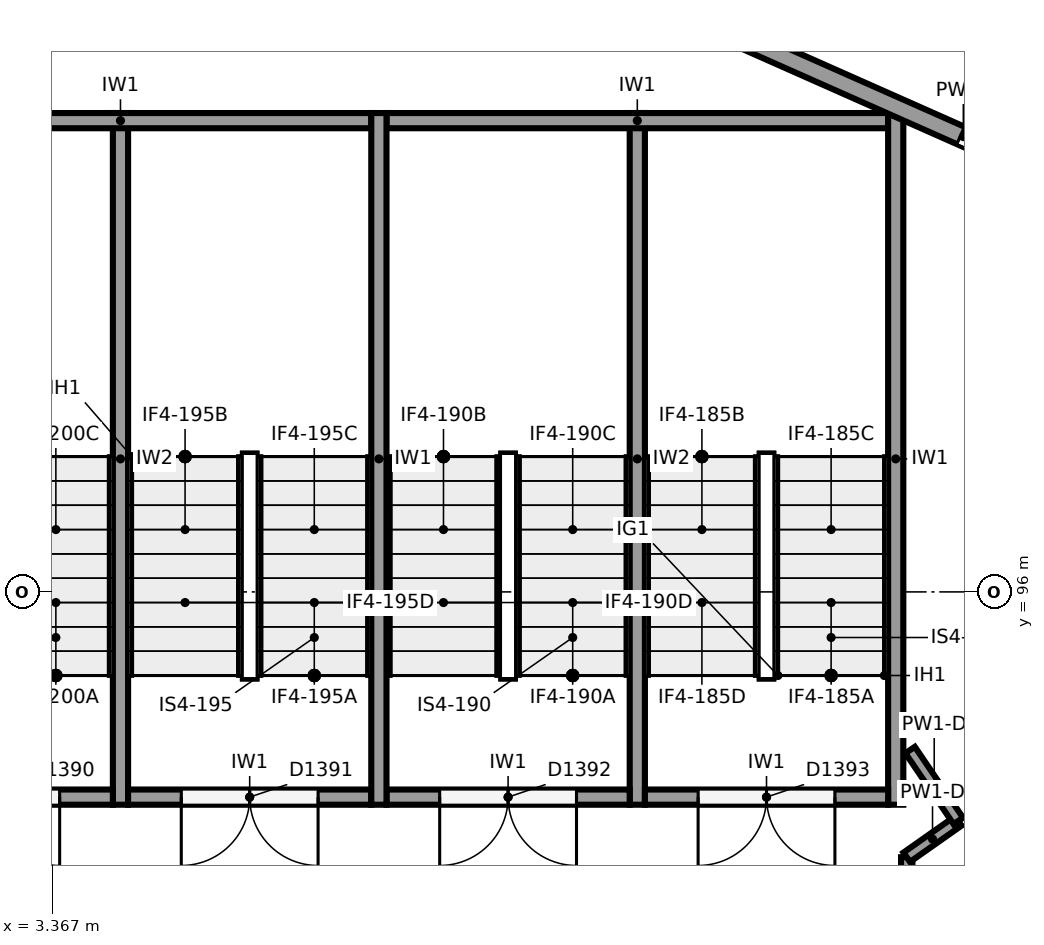
"""IFC4 building model, lengths in metres.
Left out: names, types, materials, properties, quantities, classifications, styles, units other than length and angle.
Written with IfcOpenShell. Run it as: python <this file> out.ifc"""

import sys

from ifc_helpers import new_model, si_unit, direction, frame, frame_2d, origin, place, context, subcontext, project, spatial, rectangle, extrude, element, fill, save


model = new_model("IFC4")
c1 = context("Model", 3, precision=1e-05, world=origin(), true_north=direction((0.0, 1.0)))
c2 = subcontext(c1, "Body", "Model", "MODEL_VIEW")
j1 = project(units=[si_unit("LENGTHUNIT", "METRE"), si_unit("PLANEANGLEUNIT", "RADIAN")], contexts=[c1])
p1 = place(None, origin())
s1 = spatial("IfcSite", under=j1, at=p1, CompositionType="ELEMENT")
p2 = place(p1, origin())
s2 = spatial("IfcBuilding", under=s1, at=p2, CompositionType="ELEMENT")
p3 = place(p2, frame((0.0, 0.0, 18.0)))
s3 = spatial("IfcBuildingStorey", under=s2, at=p3, CompositionType="ELEMENT", Elevation=18.0)
p4 = place(p3, frame((8.123, 105.198, 0.0), z_axis=(0.0, 0.0, 1.0), x_axis=(0.914138897099, -0.405401130748, 0.0)))
e1 = element("IfcWall", 1, at=p4, inside=s3, PredefinedType="SOLIDWALL", context=c2, shape_type="SweptSolid", body=[
    extrude(rectangle(XDim=15.824, YDim=0.25, at=frame_2d((7.912, 0.0))), origin(), (0.0, 0.0, 1.0), 4.3),
])
p5 = place(p4, frame((14.174, 0.0, 1.0)))
e2 = element("IfcOpeningElement", 2, at=p5, cuts=e1, PredefinedType="OPENING", context=c2, shape_type="SweptSolid", body=[
    extrude(rectangle(XDim=0.9, YDim=3.25, at=frame_2d((0.45, 1.625))), frame((0.0, 0.135, 0.0), z_axis=(0.0, -1.0, 0.0), x_axis=(1.0, 0.0, 0.0)), (0.0, 0.0, 1.0), 0.27),
])
p6 = place(p4, frame((12.074, 0.0, 1.0)))
e3 = element("IfcOpeningElement", 3, at=p6, cuts=e1, PredefinedType="OPENING", context=c2, shape_type="SweptSolid", body=[
    extrude(rectangle(XDim=0.9, YDim=3.25, at=frame_2d((0.45, 1.625))), frame((0.0, 0.135, 0.0), z_axis=(0.0, -1.0, 0.0), x_axis=(1.0, 0.0, 0.0)), (0.0, 0.0, 1.0), 0.27),
])
p7 = place(p4, frame((9.974, 0.0, 1.0)))
e4 = element("IfcOpeningElement", 4, at=p7, cuts=e1, PredefinedType="OPENING", context=c2, shape_type="SweptSolid", body=[
    extrude(rectangle(XDim=0.9, YDim=3.25, at=frame_2d((0.45, 1.625))), frame((0.0, 0.135, 0.0), z_axis=(0.0, -1.0, 0.0), x_axis=(1.0, 0.0, 0.0)), (0.0, 0.0, 1.0), 0.27),
])
p8 = place(p4, frame((7.874, 0.0, 1.0)))
e5 = element("IfcOpeningElement", 5, at=p8, cuts=e1, PredefinedType="OPENING", context=c2, shape_type="SweptSolid", body=[
    extrude(rectangle(XDim=0.9, YDim=3.25, at=frame_2d((0.45, 1.625))), frame((0.0, 0.135, 0.0), z_axis=(0.0, -1.0, 0.0), x_axis=(1.0, 0.0, 0.0)), (0.0, 0.0, 1.0), 0.27),
])
p9 = place(p3, frame((-7.256, 98.782, 0.0), z_axis=(0.0, 0.0, 1.0), x_axis=(0.914136361455, 0.405406848322, 0.0)))
e6 = element("IfcWall", 6, at=p9, inside=s3, PredefinedType="SOLIDWALL", context=c2, shape_type="SweptSolid", body=[
    extrude(rectangle(XDim=15.824, YDim=0.25, at=frame_2d((7.912, 0.0))), origin(), (0.0, 0.0, 1.0), 4.3),
])
p10 = place(p9, frame((0.75, 0.0, 1.0)))
e7 = element("IfcOpeningElement", 7, at=p10, cuts=e6, PredefinedType="OPENING", context=c2, shape_type="SweptSolid", body=[
    extrude(rectangle(XDim=0.9, YDim=3.25, at=frame_2d((0.45, 1.625))), frame((0.0, 0.135, 0.0), z_axis=(0.0, -1.0, 0.0), x_axis=(1.0, 0.0, 0.0)), (0.0, 0.0, 1.0), 0.27),
])
p11 = place(p9, frame((2.85, 0.0, 1.0)))
e8 = element("IfcOpeningElement", 8, at=p11, cuts=e6, PredefinedType="OPENING", context=c2, shape_type="SweptSolid", body=[
    extrude(rectangle(XDim=0.9, YDim=3.25, at=frame_2d((0.45, 1.625))), frame((0.0, 0.135, 0.0), z_axis=(0.0, -1.0, 0.0), x_axis=(1.0, 0.0, 0.0)), (0.0, 0.0, 1.0), 0.27),
])
p12 = place(p9, frame((4.95, 0.0, 1.0)))
e9 = element("IfcOpeningElement", 9, at=p12, cuts=e6, PredefinedType="OPENING", context=c2, shape_type="SweptSolid", body=[
    extrude(rectangle(XDim=0.9, YDim=3.25, at=frame_2d((0.45, 1.625))), frame((0.0, 0.135, 0.0), z_axis=(0.0, -1.0, 0.0), x_axis=(1.0, 0.0, 0.0)), (0.0, 0.0, 1.0), 0.27),
])
p13 = place(p9, frame((7.05, 0.0, 1.0)))
e10 = element("IfcOpeningElement", 10, at=p13, cuts=e6, PredefinedType="OPENING", context=c2, shape_type="SweptSolid", body=[
    extrude(rectangle(XDim=0.9, YDim=3.25, at=frame_2d((0.45, 1.625))), frame((0.0, 0.135, 0.0), z_axis=(0.0, -1.0, 0.0), x_axis=(1.0, 0.0, 0.0)), (0.0, 0.0, 1.0), 0.27),
])
for number, where, z_axis, x_axis in (
    (11, (14.467, 102.3, 0.0), (0.0, 0.0, 1.0), (0.0, -1.0, 0.0)),
    (12, (7.667, 102.3, 0.0), (0.0, 0.0, 1.0), (0.0, -1.0, 0.0)),
):
    element("IfcWall", number, at=place(p3, frame(where, z_axis=z_axis, x_axis=x_axis)), inside=s3, PredefinedType="SHEAR", context=c2, shape_type="SweptSolid", body=[
        extrude(rectangle(XDim=9.1, YDim=0.2, at=frame_2d((4.55, 0.0))), origin(), (0.0, 0.0, 1.0), 5.6),
    ])
p14 = place(p3, frame((14.367, 102.2, 0.0), z_axis=(0.0, 0.0, 1.0), x_axis=(-1.0, 0.0, 0.0)))
e13 = element("IfcWall", 13, at=p14, inside=s3, PredefinedType="SHEAR", context=c2, shape_type="SweptSolid", body=[
    extrude(rectangle(XDim=6.6, YDim=0.2, at=frame_2d((3.3, 0.0))), origin(), (0.0, 0.0, 1.0), 5.6),
])
p15 = place(p3, frame((7.567, 102.2, 0.0), z_axis=(0.0, 0.0, 1.0), x_axis=(-1.0, 0.0, 0.0)))
e14 = element("IfcWall", 14, at=p15, inside=s3, PredefinedType="SHEAR", context=c2, shape_type="SweptSolid", body=[
    extrude(rectangle(XDim=6.6, YDim=0.2, at=frame_2d((3.3, 0.0))), origin(), (0.0, 0.0, 1.0), 5.6),
])
for number, where, z_axis, x_axis in (
    (15, (11.067, 102.3, 0.0), (0.0, 0.0, 1.0), (0.0, -1.0, 0.0)),
    (16, (4.267, 102.3, 0.0), (0.0, 0.0, 1.0), (0.0, -1.0, 0.0)),
):
    element("IfcWall", number, at=place(p3, frame(where, z_axis=z_axis, x_axis=x_axis)), inside=s3, PredefinedType="SHEAR", context=c2, shape_type="SweptSolid", body=[
        extrude(rectangle(XDim=9.1, YDim=0.2, at=frame_2d((4.55, 0.0))), origin(), (0.0, 0.0, 1.0), 5.6),
    ])
p16 = place(p3, frame((14.367, 93.3, 0.0), z_axis=(0.0, 0.0, 1.0), x_axis=(-1.0, 0.0, 0.0)))
e17 = element("IfcWall", 17, at=p16, inside=s3, PredefinedType="SHEAR", context=c2, shape_type="SweptSolid", body=[
    extrude(rectangle(XDim=3.2, YDim=0.2, at=frame_2d((1.6, 0.0))), origin(), (0.0, 0.0, 1.0), 5.6),
])
p17 = place(p16, frame((0.7, 0.0, 0.0)))
e18 = element("IfcOpeningElement", 18, at=p17, cuts=e17, PredefinedType="OPENING", context=c2, shape_type="SweptSolid", body=[
    extrude(rectangle(XDim=1.8, YDim=2.1, at=frame_2d((0.9, 1.05))), frame((0.0, 0.11, 0.0), z_axis=(0.0, -1.0, 0.0), x_axis=(1.0, 0.0, 0.0)), (0.0, 0.0, 1.0), 0.22),
])
p18 = place(p3, frame((10.967, 93.3, 0.0), z_axis=(0.0, 0.0, 1.0), x_axis=(-1.0, 0.0, 0.0)))
e19 = element("IfcWall", 19, at=p18, inside=s3, PredefinedType="SHEAR", context=c2, shape_type="SweptSolid", body=[
    extrude(rectangle(XDim=3.2, YDim=0.2, at=frame_2d((1.6, 0.0))), origin(), (0.0, 0.0, 1.0), 5.6),
])
p19 = place(p18, frame((0.7, 0.0, 0.0)))
e20 = element("IfcOpeningElement", 20, at=p19, cuts=e19, PredefinedType="OPENING", context=c2, shape_type="SweptSolid", body=[
    extrude(rectangle(XDim=1.8, YDim=2.1, at=frame_2d((0.9, 1.05))), frame((0.0, 0.11, 0.0), z_axis=(0.0, -1.0, 0.0), x_axis=(1.0, 0.0, 0.0)), (0.0, 0.0, 1.0), 0.22),
])
p20 = place(p3, frame((7.567, 93.3, 0.0), z_axis=(0.0, 0.0, 1.0), x_axis=(-1.0, 0.0, 0.0)))
e21 = element("IfcWall", 21, at=p20, inside=s3, PredefinedType="SHEAR", context=c2, shape_type="SweptSolid", body=[
    extrude(rectangle(XDim=3.2, YDim=0.2, at=frame_2d((1.6, 0.0))), origin(), (0.0, 0.0, 1.0), 5.6),
])
p21 = place(p20, frame((0.7, 0.0, 0.0)))
e22 = element("IfcOpeningElement", 22, at=p21, cuts=e21, PredefinedType="OPENING", context=c2, shape_type="SweptSolid", body=[
    extrude(rectangle(XDim=1.8, YDim=2.1, at=frame_2d((0.9, 1.05))), frame((0.0, 0.11, 0.0), z_axis=(0.0, -1.0, 0.0), x_axis=(1.0, 0.0, 0.0)), (0.0, 0.0, 1.0), 0.22),
])
p22 = place(p3, frame((4.167, 93.3, 0.0), z_axis=(0.0, 0.0, 1.0), x_axis=(-1.0, 0.0, 0.0)))
e23 = element("IfcWall", 23, at=p22, inside=s3, PredefinedType="SHEAR", context=c2, shape_type="SweptSolid", body=[
    extrude(rectangle(XDim=3.2, YDim=0.2, at=frame_2d((1.6, 0.0))), origin(), (0.0, 0.0, 1.0), 5.6),
])
p23 = place(p22, frame((0.7, 0.0, 0.0)))
e24 = element("IfcOpeningElement", 24, at=p23, cuts=e23, PredefinedType="OPENING", context=c2, shape_type="SweptSolid", body=[
    extrude(rectangle(XDim=1.8, YDim=2.1, at=frame_2d((0.9, 1.05))), frame((0.0, 0.11, 0.0), z_axis=(0.0, -1.0, 0.0), x_axis=(1.0, 0.0, 0.0)), (0.0, 0.0, 1.0), 0.22),
])
p24 = place(p3, frame((14.612, 86.155, 0.0), z_axis=(0.0, 0.0, 1.0), x_axis=(0.0, 1.0, 0.0)))
e25 = element("IfcWall", 25, at=p24, inside=s3, PredefinedType="PARTITIONING", context=c2, shape_type="SweptSolid", body=[
    extrude(rectangle(XDim=6.354, YDim=0.15, at=frame_2d((3.177, 0.0))), origin(), (0.0, 0.0, 1.0), 3.115),
])
p25 = place(p24, frame((1.95, 0.0, 0.0)))
e26 = element("IfcOpeningElement", 26, at=p25, cuts=e25, PredefinedType="OPENING", context=c2, shape_type="SweptSolid", body=[
    extrude(rectangle(XDim=1.8, YDim=2.1, at=frame_2d((0.9, 1.05))), frame((0.0, 0.085, 0.0), z_axis=(0.0, -1.0, 0.0), x_axis=(1.0, 0.0, 0.0)), (0.0, 0.0, 1.0), 0.17),
])
p26 = place(p3, frame((14.612, 92.509, 0.0), z_axis=(0.0, 0.0, 1.0), x_axis=(0.81774999294, 0.575573582652, 0.0)))
e27 = element("IfcWall", 27, at=p26, inside=s3, PredefinedType="PARTITIONING", context=c2, shape_type="SweptSolid", body=[
    extrude(rectangle(XDim=0.83, YDim=0.15, at=frame_2d((0.415, 0.0))), origin(), (0.0, 0.0, 1.0), 3.115),
])
p27 = place(p3, frame((15.29, 92.987, 0.0), z_axis=(0.0, 0.0, 1.0), x_axis=(-0.562120553728, 0.827055308354, 0.0)))
e28 = element("IfcWall", 28, at=p27, inside=s3, PredefinedType="PARTITIONING", context=c2, shape_type="SweptSolid", body=[
    extrude(rectangle(XDim=1.128, YDim=0.15, at=frame_2d((0.564, 0.0))), origin(), (0.0, 0.0, 1.0), 3.115),
])
p28 = place(p8, origin())
e29 = element("IfcWindow", 29, at=p28, inside=s3, PartitioningType="SINGLE_PANEL", PredefinedType="WINDOW", context=c2, shape_type="SweptSolid", body=[
    extrude(rectangle(XDim=0.9, YDim=3.25, at=frame_2d((0.45, 1.625))), frame((0.0, 0.03, 0.0), z_axis=(0.0, -1.0, 0.0), x_axis=(1.0, 0.0, 0.0)), (0.0, 0.0, 1.0), 0.06),
])
fill(e5, e29)
p29 = place(p17, origin())
e30 = element("IfcDoor", 30, at=p29, inside=s3, OperationType="DOUBLE_DOOR_SINGLE_SWING", PredefinedType="DOOR", context=c2, shape_type="SweptSolid", body=[
    extrude(rectangle(XDim=1.8, YDim=2.1, at=frame_2d((0.9, 1.05))), frame((0.0, 0.025, 0.0), z_axis=(0.0, -1.0, 0.0), x_axis=(1.0, 0.0, 0.0)), (0.0, 0.0, 1.0), 0.05),
])
fill(e18, e30)
p30 = place(p19, origin())
e31 = element("IfcDoor", 31, at=p30, inside=s3, OperationType="DOUBLE_DOOR_SINGLE_SWING", PredefinedType="DOOR", context=c2, shape_type="SweptSolid", body=[
    extrude(rectangle(XDim=1.8, YDim=2.1, at=frame_2d((0.9, 1.05))), frame((0.0, 0.025, 0.0), z_axis=(0.0, -1.0, 0.0), x_axis=(1.0, 0.0, 0.0)), (0.0, 0.0, 1.0), 0.05),
])
fill(e20, e31)
p31 = place(p21, origin())
e32 = element("IfcDoor", 32, at=p31, inside=s3, OperationType="DOUBLE_DOOR_SINGLE_SWING", PredefinedType="DOOR", context=c2, shape_type="SweptSolid", body=[
    extrude(rectangle(XDim=1.8, YDim=2.1, at=frame_2d((0.9, 1.05))), frame((0.0, 0.025, 0.0), z_axis=(0.0, -1.0, 0.0), x_axis=(1.0, 0.0, 0.0)), (0.0, 0.0, 1.0), 0.05),
])
fill(e22, e32)
p32 = place(p23, origin())
e33 = element("IfcDoor", 33, at=p32, inside=s3, OperationType="DOUBLE_DOOR_SINGLE_SWING", PredefinedType="DOOR", context=c2, shape_type="SweptSolid", body=[
    extrude(rectangle(XDim=1.8, YDim=2.1, at=frame_2d((0.9, 1.05))), frame((0.0, 0.025, 0.0), z_axis=(0.0, -1.0, 0.0), x_axis=(1.0, 0.0, 0.0)), (0.0, 0.0, 1.0), 0.05),
])
fill(e24, e33)
save(model, sys.argv[1])
